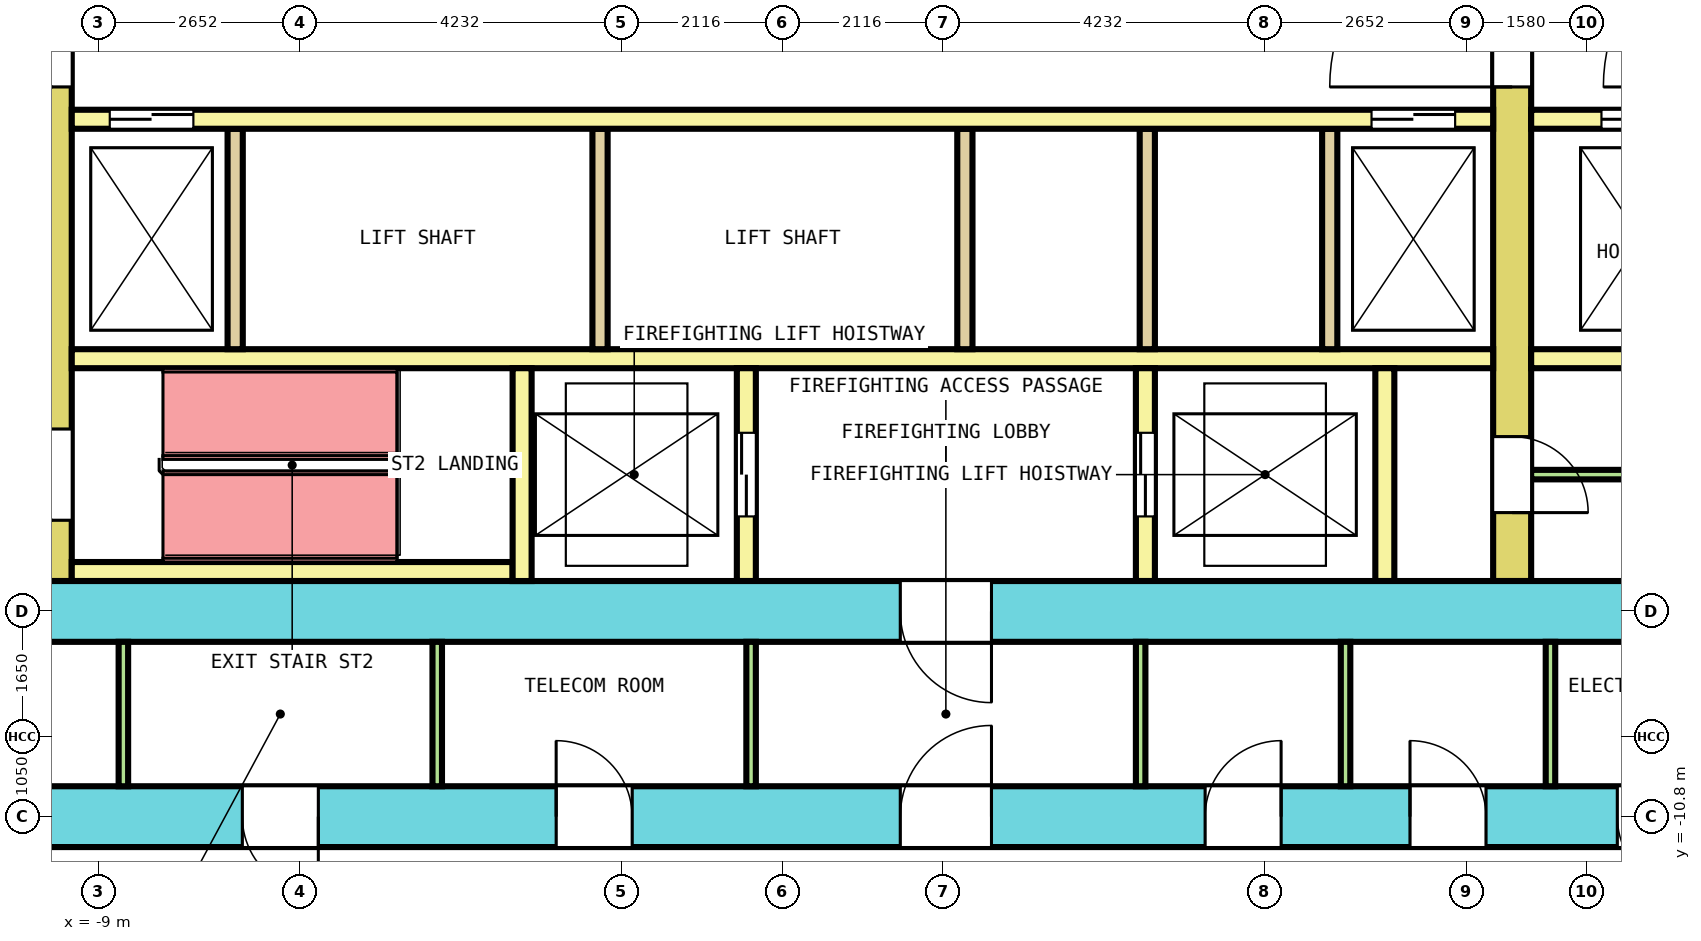
"""IFC4 building model, lengths in metres.
Left out: names, types, materials, properties, quantities, classifications, styles, units other than length and angle.
Written with IfcOpenShell. Run it as: python <this file> out.ifc"""

import sys

from ifc_helpers import new_model, si_unit, direction, frame, frame_2d, origin, place, context, subcontext, project, spatial, rectangle, extrude, element, fill, save


model = new_model("IFC4")
c1 = context("Model", 3, precision=1e-05, world=origin(), true_north=direction((0.0, 1.0)))
c2 = subcontext(c1, "Body", "Model", "MODEL_VIEW")
j1 = project(units=[si_unit("LENGTHUNIT", "METRE"), si_unit("PLANEANGLEUNIT", "RADIAN")], contexts=[c1])
p1 = place(None, origin())
s1 = spatial("IfcSite", under=j1, at=p1, CompositionType="ELEMENT")
p2 = place(p1, origin())
s2 = spatial("IfcBuilding", under=s1, at=p2, CompositionType="ELEMENT")
p3 = place(p2, frame((0.0, 0.0, 85.2)))
s3 = spatial("IfcBuildingStorey", under=s2, at=p3, CompositionType="ELEMENT", Elevation=85.2)
p4 = place(p3, frame((-13.6, -10.8, 0.0), z_axis=(0.0, 0.0, 1.0), x_axis=(1.0, 0.0, 0.0)))
e1 = element("IfcWall", 1, at=p4, inside=s3, PredefinedType="SHEAR", context=c2, shape_type="SweptSolid", body=[
    extrude(rectangle(XDim=27.2, YDim=0.8, at=frame_2d((13.6, 0.0))), origin(), (0.0, 0.0, 1.0), 4.1),
])
p5 = place(p4, frame((2.333, 0.0, 0.0)))
e2 = element("IfcOpeningElement", 2, at=p5, cuts=e1, PredefinedType="OPENING", context=c2, shape_type="SweptSolid", body=[
    extrude(rectangle(XDim=1.0, YDim=2.1, at=frame_2d((0.5, 1.05))), frame((0.0, 0.41, 0.0), z_axis=(0.0, -1.0, 0.0), x_axis=(1.0, 0.0, 0.0)), (0.0, 0.0, 1.0), 0.82),
])
p6 = place(p4, frame((6.494, 0.0, 0.0)))
e3 = element("IfcOpeningElement", 3, at=p6, cuts=e1, PredefinedType="OPENING", context=c2, shape_type="SweptSolid", body=[
    extrude(rectangle(XDim=1.0, YDim=2.1, at=frame_2d((0.5, 1.05))), frame((0.0, 0.41, 0.0), z_axis=(0.0, -1.0, 0.0), x_axis=(1.0, 0.0, 0.0)), (0.0, 0.0, 1.0), 0.82),
])
p7 = place(p4, frame((10.623, 0.0, 0.0)))
e4 = element("IfcOpeningElement", 4, at=p7, cuts=e1, PredefinedType="OPENING", context=c2, shape_type="SweptSolid", body=[
    extrude(rectangle(XDim=1.0, YDim=2.1, at=frame_2d((0.5, 1.05))), frame((0.0, 0.41, 0.0), z_axis=(0.0, -1.0, 0.0), x_axis=(1.0, 0.0, 0.0)), (0.0, 0.0, 1.0), 0.82),
])
p8 = place(p4, frame((19.16, 0.0, 0.0)))
e5 = element("IfcOpeningElement", 5, at=p8, cuts=e1, PredefinedType="OPENING", context=c2, shape_type="SweptSolid", body=[
    extrude(rectangle(XDim=1.0, YDim=2.1, at=frame_2d((0.5, 1.05))), frame((0.0, 0.41, 0.0), z_axis=(0.0, -1.0, 0.0), x_axis=(1.0, 0.0, 0.0)), (0.0, 0.0, 1.0), 0.82),
])
p9 = place(p4, frame((21.856, 0.0, 0.0)))
e6 = element("IfcOpeningElement", 6, at=p9, cuts=e1, PredefinedType="OPENING", context=c2, shape_type="SweptSolid", body=[
    extrude(rectangle(XDim=1.0, YDim=2.1, at=frame_2d((0.5, 1.05))), frame((0.0, 0.41, 0.0), z_axis=(0.0, -1.0, 0.0), x_axis=(1.0, 0.0, 0.0)), (0.0, 0.0, 1.0), 0.82),
])
p10 = place(p4, frame((24.583, 0.0, 0.0)))
e7 = element("IfcOpeningElement", 7, at=p10, cuts=e1, PredefinedType="OPENING", context=c2, shape_type="SweptSolid", body=[
    extrude(rectangle(XDim=1.0, YDim=2.1, at=frame_2d((0.5, 1.05))), frame((0.0, 0.41, 0.0), z_axis=(0.0, -1.0, 0.0), x_axis=(1.0, 0.0, 0.0)), (0.0, 0.0, 1.0), 0.82),
])
p11 = place(p4, frame((15.15, 0.0, 0.0)))
e8 = element("IfcOpeningElement", 8, at=p11, cuts=e1, PredefinedType="OPENING", context=c2, shape_type="SweptSolid", body=[
    extrude(rectangle(XDim=1.2, YDim=2.1, at=frame_2d((0.6, 1.05))), frame((0.0, 0.41, 0.0), z_axis=(0.0, -1.0, 0.0), x_axis=(1.0, 0.0, 0.0)), (0.0, 0.0, 1.0), 0.82),
])
p12 = place(p3, frame((-12.8, -8.1, 0.0), z_axis=(0.0, 0.0, 1.0), x_axis=(1.0, 0.0, 0.0)))
e9 = element("IfcWall", 9, at=p12, inside=s3, PredefinedType="SHEAR", context=c2, shape_type="SweptSolid", body=[
    extrude(rectangle(XDim=25.6, YDim=0.8, at=frame_2d((12.8, 0.0))), origin(), (0.0, 0.0, 1.0), 4.1),
])
p13 = place(p12, frame((14.35, 0.0, 0.0)))
e10 = element("IfcOpeningElement", 10, at=p13, cuts=e9, PredefinedType="OPENING", context=c2, shape_type="SweptSolid", body=[
    extrude(rectangle(XDim=1.2, YDim=2.1, at=frame_2d((0.6, 1.05))), frame((0.0, 0.41, 0.0), z_axis=(0.0, -1.0, 0.0), x_axis=(1.0, 0.0, 0.0)), (0.0, 0.0, 1.0), 0.82),
])
p14 = place(p3, frame((-9.6, -7.7, 0.0), z_axis=(0.0, 0.0, 1.0), x_axis=(0.0, 1.0, 0.0)))
e11 = element("IfcWall", 11, at=p14, inside=s3, PredefinedType="SHEAR", context=c2, shape_type="SweptSolid", body=[
    extrude(rectangle(XDim=15.4, YDim=0.5, at=frame_2d((7.7, 0.0))), origin(), (0.0, 0.0, 1.0), 4.1),
])
p15 = place(p14, frame((6.5, 0.0, 0.0)))
e12 = element("IfcOpeningElement", 12, at=p15, cuts=e11, PredefinedType="OPENING", context=c2, shape_type="SweptSolid", body=[
    extrude(rectangle(XDim=2.4, YDim=2.1, at=frame_2d((1.2, 1.05))), frame((0.0, 0.26, 0.0), z_axis=(0.0, -1.0, 0.0), x_axis=(1.0, 0.0, 0.0)), (0.0, 0.0, 1.0), 0.52),
])
p16 = place(p14, frame((13.4, 0.0, 0.0)))
e13 = element("IfcOpeningElement", 13, at=p16, cuts=e11, PredefinedType="OPENING", context=c2, shape_type="SweptSolid", body=[
    extrude(rectangle(XDim=1.2, YDim=2.1, at=frame_2d((0.6, 1.05))), frame((0.0, 0.26, 0.0), z_axis=(0.0, -1.0, 0.0), x_axis=(1.0, 0.0, 0.0)), (0.0, 0.0, 1.0), 0.52),
])
p17 = place(p14, frame((0.8, 0.0, 0.0)))
e14 = element("IfcOpeningElement", 14, at=p17, cuts=e11, PredefinedType="OPENING", context=c2, shape_type="SweptSolid", body=[
    extrude(rectangle(XDim=1.2, YDim=2.1, at=frame_2d((0.6, 1.05))), frame((0.0, 0.26, 0.0), z_axis=(0.0, -1.0, 0.0), x_axis=(1.0, 0.0, 0.0)), (0.0, 0.0, 1.0), 0.52),
])
p18 = place(p3, frame((9.6, -7.7, 0.0), z_axis=(0.0, 0.0, 1.0), x_axis=(0.0, 1.0, 0.0)))
e15 = element("IfcWall", 15, at=p18, inside=s3, PredefinedType="SHEAR", context=c2, shape_type="SweptSolid", body=[
    extrude(rectangle(XDim=15.4, YDim=0.5, at=frame_2d((7.7, 0.0))), origin(), (0.0, 0.0, 1.0), 4.1),
])
p19 = place(p18, frame((6.5, 0.0, 0.0)))
e16 = element("IfcOpeningElement", 16, at=p19, cuts=e15, PredefinedType="OPENING", context=c2, shape_type="SweptSolid", body=[
    extrude(rectangle(XDim=2.4, YDim=2.1, at=frame_2d((1.2, 1.05))), frame((0.0, 0.26, 0.0), z_axis=(0.0, -1.0, 0.0), x_axis=(1.0, 0.0, 0.0)), (0.0, 0.0, 1.0), 0.52),
])
p20 = place(p18, frame((13.4, 0.0, 0.0)))
e17 = element("IfcOpeningElement", 17, at=p20, cuts=e15, PredefinedType="OPENING", context=c2, shape_type="SweptSolid", body=[
    extrude(rectangle(XDim=1.2, YDim=2.1, at=frame_2d((0.6, 1.05))), frame((0.0, 0.26, 0.0), z_axis=(0.0, -1.0, 0.0), x_axis=(1.0, 0.0, 0.0)), (0.0, 0.0, 1.0), 0.52),
])
p21 = place(p18, frame((0.9, 0.0, 0.0)))
e18 = element("IfcOpeningElement", 18, at=p21, cuts=e15, PredefinedType="OPENING", context=c2, shape_type="SweptSolid", body=[
    extrude(rectangle(XDim=1.0, YDim=2.1, at=frame_2d((0.5, 1.05))), frame((0.0, 0.26, 0.0), z_axis=(0.0, -1.0, 0.0), x_axis=(1.0, 0.0, 0.0)), (0.0, 0.0, 1.0), 0.52),
])
p22 = place(p3, frame((-9.35, -1.625, 0.0), z_axis=(0.0, 0.0, 1.0), x_axis=(1.0, 0.0, 0.0)))
e19 = element("IfcWall", 19, at=p22, inside=s3, PredefinedType="SOLIDWALL", context=c2, shape_type="SweptSolid", body=[
    extrude(rectangle(XDim=18.7, YDim=0.25, at=frame_2d((9.35, 0.0))), origin(), (0.0, 0.0, 1.0), 4.1),
])
p23 = place(p22, frame((0.5, 0.0, 0.0)))
e20 = element("IfcOpeningElement", 20, at=p23, cuts=e19, PredefinedType="OPENING", context=c2, shape_type="SweptSolid", body=[
    extrude(rectangle(XDim=1.1, YDim=2.1, at=frame_2d((0.55, 1.05))), frame((0.0, 0.135, 0.0), z_axis=(0.0, -1.0, 0.0), x_axis=(1.0, 0.0, 0.0)), (0.0, 0.0, 1.0), 0.27),
])
p24 = place(p22, frame((17.1, 0.0, 0.0)))
e21 = element("IfcOpeningElement", 21, at=p24, cuts=e19, PredefinedType="OPENING", context=c2, shape_type="SweptSolid", body=[
    extrude(rectangle(XDim=1.1, YDim=2.1, at=frame_2d((0.55, 1.05))), frame((0.0, 0.135, 0.0), z_axis=(0.0, -1.0, 0.0), x_axis=(1.0, 0.0, 0.0)), (0.0, 0.0, 1.0), 0.27),
])
p25 = place(p3, frame((9.85, -1.625, 0.0), z_axis=(0.0, 0.0, 1.0), x_axis=(1.0, 0.0, 0.0)))
e22 = element("IfcWall", 22, at=p25, inside=s3, PredefinedType="SOLIDWALL", context=c2, shape_type="SweptSolid", body=[
    extrude(rectangle(XDim=2.95, YDim=0.25, at=frame_2d((1.475, 0.0))), origin(), (0.0, 0.0, 1.0), 4.1),
])
p26 = place(p25, frame((0.925, 0.0, 0.0)))
e23 = element("IfcOpeningElement", 23, at=p26, cuts=e22, PredefinedType="OPENING", context=c2, shape_type="SweptSolid", body=[
    extrude(rectangle(XDim=1.1, YDim=2.1, at=frame_2d((0.55, 1.05))), frame((0.0, 0.135, 0.0), z_axis=(0.0, -1.0, 0.0), x_axis=(1.0, 0.0, 0.0)), (0.0, 0.0, 1.0), 0.27),
])
p27 = place(p3, frame((-9.35, -4.775, 0.0), z_axis=(0.0, 0.0, 1.0), x_axis=(1.0, 0.0, 0.0)))
e24 = element("IfcWall", 24, at=p27, inside=s3, PredefinedType="SOLIDWALL", context=c2, shape_type="SweptSolid", body=[
    extrude(rectangle(XDim=18.7, YDim=0.25, at=frame_2d((9.35, 0.0))), origin(), (0.0, 0.0, 1.0), 4.1),
])
p28 = place(p3, frame((9.85, -4.775, 0.0), z_axis=(0.0, 0.0, 1.0), x_axis=(1.0, 0.0, 0.0)))
e25 = element("IfcWall", 25, at=p28, inside=s3, PredefinedType="SOLIDWALL", context=c2, shape_type="SweptSolid", body=[
    extrude(rectangle(XDim=2.95, YDim=0.25, at=frame_2d((1.475, 0.0))), origin(), (0.0, 0.0, 1.0), 4.1),
])
for number, where, z_axis, x_axis in (
    (26, (-7.2, -4.65, 0.0), (0.0, 0.0, 1.0), (0.0, 1.0, 0.0)),
    (27, (-2.4, -4.65, 0.0), (0.0, 0.0, 1.0), (0.0, 1.0, 0.0)),
    (28, (2.4, -4.65, 0.0), (0.0, 0.0, 1.0), (0.0, 1.0, 0.0)),
    (29, (4.8, -4.65, 0.0), (0.0, 0.0, 1.0), (0.0, 1.0, 0.0)),
    (30, (7.2, -4.65, 0.0), (0.0, 0.0, 1.0), (0.0, 1.0, 0.0)),
):
    element("IfcWall", number, at=place(p3, frame(where, z_axis=z_axis, x_axis=x_axis)), inside=s3, PredefinedType="SOLIDWALL", context=c2, shape_type="SweptSolid", body=[
        extrude(rectangle(XDim=2.9, YDim=0.2, at=frame_2d((1.45, 0.0))), origin(), (0.0, 0.0, 1.0), 4.1),
    ])
p29 = place(p3, frame((-9.35, -7.575, 0.0), z_axis=(0.0, 0.0, 1.0), x_axis=(1.0, 0.0, 0.0)))
e31 = element("IfcWall", 31, at=p29, inside=s3, PredefinedType="SOLIDWALL", context=c2, shape_type="SweptSolid", body=[
    extrude(rectangle(XDim=5.8, YDim=0.25, at=frame_2d((2.9, 0.0))), origin(), (0.0, 0.0, 1.0), 4.1),
])
p30 = place(p3, frame((-3.425, -7.7, 0.0), z_axis=(0.0, 0.0, 1.0), x_axis=(0.0, 1.0, 0.0)))
e32 = element("IfcWall", 32, at=p30, inside=s3, PredefinedType="SOLIDWALL", context=c2, shape_type="SweptSolid", body=[
    extrude(rectangle(XDim=2.8, YDim=0.25, at=frame_2d((1.4, 0.0))), origin(), (0.0, 0.0, 1.0), 4.1),
])
p31 = place(p3, frame((-0.475, -7.7, 0.0), z_axis=(0.0, 0.0, 1.0), x_axis=(0.0, 1.0, 0.0)))
e33 = element("IfcWall", 33, at=p31, inside=s3, PredefinedType="SOLIDWALL", context=c2, shape_type="SweptSolid", body=[
    extrude(rectangle(XDim=2.8, YDim=0.25, at=frame_2d((1.4, 0.0))), origin(), (0.0, 0.0, 1.0), 4.1),
])
p32 = place(p31, frame((0.85, 0.0, 0.0)))
e34 = element("IfcOpeningElement", 34, at=p32, cuts=e33, PredefinedType="OPENING", context=c2, shape_type="SweptSolid", body=[
    extrude(rectangle(XDim=1.1, YDim=2.1, at=frame_2d((0.55, 1.05))), frame((0.0, 0.135, 0.0), z_axis=(0.0, -1.0, 0.0), x_axis=(1.0, 0.0, 0.0)), (0.0, 0.0, 1.0), 0.27),
])
p33 = place(p3, frame((4.775, -7.7, 0.0), z_axis=(0.0, 0.0, 1.0), x_axis=(0.0, 1.0, 0.0)))
e35 = element("IfcWall", 35, at=p33, inside=s3, PredefinedType="SOLIDWALL", context=c2, shape_type="SweptSolid", body=[
    extrude(rectangle(XDim=2.8, YDim=0.25, at=frame_2d((1.4, 0.0))), origin(), (0.0, 0.0, 1.0), 4.1),
])
p34 = place(p33, frame((0.85, 0.0, 0.0)))
e36 = element("IfcOpeningElement", 36, at=p34, cuts=e35, PredefinedType="OPENING", context=c2, shape_type="SweptSolid", body=[
    extrude(rectangle(XDim=1.1, YDim=2.1, at=frame_2d((0.55, 1.05))), frame((0.0, 0.135, 0.0), z_axis=(0.0, -1.0, 0.0), x_axis=(1.0, 0.0, 0.0)), (0.0, 0.0, 1.0), 0.27),
])
p35 = place(p3, frame((7.925, -7.7, 0.0), z_axis=(0.0, 0.0, 1.0), x_axis=(0.0, 1.0, 0.0)))
e37 = element("IfcWall", 37, at=p35, inside=s3, PredefinedType="SOLIDWALL", context=c2, shape_type="SweptSolid", body=[
    extrude(rectangle(XDim=2.8, YDim=0.25, at=frame_2d((1.4, 0.0))), origin(), (0.0, 0.0, 1.0), 4.1),
])
p36 = place(p3, frame((9.85, -6.3, 0.0), z_axis=(0.0, 0.0, 1.0), x_axis=(1.0, 0.0, 0.0)))
e38 = element("IfcWall", 38, at=p36, inside=s3, PredefinedType="PARTITIONING", context=c2, shape_type="SweptSolid", body=[
    extrude(rectangle(XDim=2.95, YDim=0.125, at=frame_2d((1.475, 0.0))), origin(), (0.0, 0.0, 1.0), 4.1),
])
for number, where, z_axis, x_axis in (
    (39, (-8.671, -10.4, 0.0), (0.0, 0.0, 1.0), (0.0, 1.0, 0.0)),
    (40, (-4.542, -10.4, 0.0), (0.0, 0.0, 1.0), (0.0, 1.0, 0.0)),
    (41, (-0.413, -10.4, 0.0), (0.0, 0.0, 1.0), (0.0, 1.0, 0.0)),
    (42, (4.712, -10.4, 0.0), (0.0, 0.0, 1.0), (0.0, 1.0, 0.0)),
    (43, (7.408, -10.4, 0.0), (0.0, 0.0, 1.0), (0.0, 1.0, 0.0)),
    (44, (10.104, -10.4, 0.0), (0.0, 0.0, 1.0), (0.0, 1.0, 0.0)),
):
    element("IfcWall", number, at=place(p3, frame(where, z_axis=z_axis, x_axis=x_axis)), inside=s3, PredefinedType="PARTITIONING", context=c2, shape_type="SweptSolid", body=[
        extrude(rectangle(XDim=1.9, YDim=0.125, at=frame_2d((0.95, 0.0))), origin(), (0.0, 0.0, 1.0), 4.1),
    ])
p37 = place(p23, origin())
e45 = element("IfcDoor", 45, at=p37, inside=s3, OperationType="DOUBLE_DOOR_SLIDING", PredefinedType="DOOR", context=c2, shape_type="SweptSolid", body=[
    extrude(rectangle(XDim=1.1, YDim=2.1, at=frame_2d((0.55, 1.05))), frame((0.0, 0.075, 0.0), z_axis=(0.0, -1.0, 0.0), x_axis=(1.0, 0.0, 0.0)), (0.0, 0.0, 1.0), 0.15),
])
fill(e20, e45)
p38 = place(p24, origin())
e46 = element("IfcDoor", 46, at=p38, inside=s3, OperationType="DOUBLE_DOOR_SLIDING", PredefinedType="DOOR", context=c2, shape_type="SweptSolid", body=[
    extrude(rectangle(XDim=1.1, YDim=2.1, at=frame_2d((0.55, 1.05))), frame((0.0, 0.075, 0.0), z_axis=(0.0, -1.0, 0.0), x_axis=(1.0, 0.0, 0.0)), (0.0, 0.0, 1.0), 0.15),
])
fill(e21, e46)
p39 = place(p26, origin())
e47 = element("IfcDoor", 47, at=p39, inside=s3, OperationType="DOUBLE_DOOR_SLIDING", PredefinedType="DOOR", context=c2, shape_type="SweptSolid", body=[
    extrude(rectangle(XDim=1.1, YDim=2.1, at=frame_2d((0.55, 1.05))), frame((0.0, 0.075, 0.0), z_axis=(0.0, -1.0, 0.0), x_axis=(1.0, 0.0, 0.0)), (0.0, 0.0, 1.0), 0.15),
])
fill(e23, e47)
p40 = place(p32, origin())
e48 = element("IfcDoor", 48, at=p40, inside=s3, OperationType="DOUBLE_DOOR_SLIDING", PredefinedType="DOOR", context=c2, shape_type="SweptSolid", body=[
    extrude(rectangle(XDim=1.1, YDim=2.1, at=frame_2d((0.55, 1.05))), frame((0.0, 0.075, 0.0), z_axis=(0.0, -1.0, 0.0), x_axis=(1.0, 0.0, 0.0)), (0.0, 0.0, 1.0), 0.15),
])
fill(e34, e48)
p41 = place(p34, origin())
e49 = element("IfcDoor", 49, at=p41, inside=s3, OperationType="DOUBLE_DOOR_SLIDING", PredefinedType="DOOR", context=c2, shape_type="SweptSolid", body=[
    extrude(rectangle(XDim=1.1, YDim=2.1, at=frame_2d((0.55, 1.05))), frame((0.0, 0.075, 0.0), z_axis=(0.0, -1.0, 0.0), x_axis=(1.0, 0.0, 0.0)), (0.0, 0.0, 1.0), 0.15),
])
fill(e36, e49)
p42 = place(p15, origin())
e50 = element("IfcDoor", 50, at=p42, inside=s3, OperationType="DOUBLE_DOOR_SINGLE_SWING", PredefinedType="DOOR", context=c2, shape_type="SweptSolid", body=[
    extrude(rectangle(XDim=2.4, YDim=2.1, at=frame_2d((1.2, 1.05))), frame((0.0, 0.2, 0.0), z_axis=(0.0, -1.0, 0.0), x_axis=(1.0, 0.0, 0.0)), (0.0, 0.0, 1.0), 0.4),
])
fill(e12, e50)
p43 = place(p19, origin())
e51 = element("IfcDoor", 51, at=p43, inside=s3, OperationType="DOUBLE_DOOR_SINGLE_SWING", PredefinedType="DOOR", context=c2, shape_type="SweptSolid", body=[
    extrude(rectangle(XDim=2.4, YDim=2.1, at=frame_2d((1.2, 1.05))), frame((0.0, 0.2, 0.0), z_axis=(0.0, -1.0, 0.0), x_axis=(1.0, 0.0, 0.0)), (0.0, 0.0, 1.0), 0.4),
])
fill(e16, e51)
p44 = place(p17, origin())
e52 = element("IfcDoor", 52, at=p44, inside=s3, OperationType="SINGLE_SWING_LEFT", PredefinedType="DOOR", context=c2, shape_type="SweptSolid", body=[
    extrude(rectangle(XDim=1.2, YDim=2.1, at=frame_2d((0.6, 1.05))), frame((0.0, 0.2, 0.0), z_axis=(0.0, -1.0, 0.0), x_axis=(1.0, 0.0, 0.0)), (0.0, 0.0, 1.0), 0.4),
])
fill(e14, e52)
p45 = place(p13, origin())
e53 = element("IfcDoor", 53, at=p45, inside=s3, OperationType="SINGLE_SWING_LEFT", PredefinedType="DOOR", context=c2, shape_type="SweptSolid", body=[
    extrude(rectangle(XDim=1.2, YDim=2.1, at=frame_2d((0.6, 1.05))), frame((0.0, 0.3, 0.0), z_axis=(0.0, -1.0, 0.0), x_axis=(1.0, 0.0, 0.0)), (0.0, 0.0, 1.0), 0.6),
])
fill(e10, e53)
p46 = place(p21, origin())
e54 = element("IfcDoor", 54, at=p46, inside=s3, OperationType="SINGLE_SWING_LEFT", PredefinedType="DOOR", context=c2, shape_type="SweptSolid", body=[
    extrude(rectangle(XDim=1.0, YDim=2.1, at=frame_2d((0.5, 1.05))), frame((0.0, 0.2, 0.0), z_axis=(0.0, -1.0, 0.0), x_axis=(1.0, 0.0, 0.0)), (0.0, 0.0, 1.0), 0.4),
])
fill(e18, e54)
p47 = place(p6, origin())
e55 = element("IfcDoor", 55, at=p47, inside=s3, OperationType="SINGLE_SWING_LEFT", PredefinedType="DOOR", context=c2, shape_type="SweptSolid", body=[
    extrude(rectangle(XDim=1.0, YDim=2.1, at=frame_2d((0.5, 1.05))), frame((0.0, 0.3, 0.0), z_axis=(0.0, -1.0, 0.0), x_axis=(1.0, 0.0, 0.0)), (0.0, 0.0, 1.0), 0.6),
])
fill(e3, e55)
p48 = place(p7, origin())
e56 = element("IfcDoor", 56, at=p48, inside=s3, OperationType="SINGLE_SWING_RIGHT", PredefinedType="DOOR", context=c2, shape_type="SweptSolid", body=[
    extrude(rectangle(XDim=1.0, YDim=2.1, at=frame_2d((0.5, 1.05))), frame((0.0, 0.3, 0.0), z_axis=(0.0, -1.0, 0.0), x_axis=(1.0, 0.0, 0.0)), (0.0, 0.0, 1.0), 0.6),
])
fill(e4, e56)
p49 = place(p8, origin())
e57 = element("IfcDoor", 57, at=p49, inside=s3, OperationType="SINGLE_SWING_LEFT", PredefinedType="DOOR", context=c2, shape_type="SweptSolid", body=[
    extrude(rectangle(XDim=1.0, YDim=2.1, at=frame_2d((0.5, 1.05))), frame((0.0, 0.3, 0.0), z_axis=(0.0, -1.0, 0.0), x_axis=(1.0, 0.0, 0.0)), (0.0, 0.0, 1.0), 0.6),
])
fill(e5, e57)
p50 = place(p9, origin())
e58 = element("IfcDoor", 58, at=p50, inside=s3, OperationType="SINGLE_SWING_RIGHT", PredefinedType="DOOR", context=c2, shape_type="SweptSolid", body=[
    extrude(rectangle(XDim=1.0, YDim=2.1, at=frame_2d((0.5, 1.05))), frame((0.0, 0.3, 0.0), z_axis=(0.0, -1.0, 0.0), x_axis=(1.0, 0.0, 0.0)), (0.0, 0.0, 1.0), 0.6),
])
fill(e6, e58)
p51 = place(p10, origin())
e59 = element("IfcDoor", 59, at=p51, inside=s3, OperationType="SINGLE_SWING_LEFT", PredefinedType="DOOR", context=c2, shape_type="SweptSolid", body=[
    extrude(rectangle(XDim=1.0, YDim=2.1, at=frame_2d((0.5, 1.05))), frame((0.0, 0.3, 0.0), z_axis=(0.0, -1.0, 0.0), x_axis=(1.0, 0.0, 0.0)), (0.0, 0.0, 1.0), 0.6),
])
fill(e7, e59)
p52 = place(p11, origin())
e60 = element("IfcDoor", 60, at=p52, inside=s3, OperationType="SINGLE_SWING_RIGHT", PredefinedType="DOOR", context=c2, shape_type="SweptSolid", body=[
    extrude(rectangle(XDim=1.2, YDim=2.1, at=frame_2d((0.6, 1.05))), frame((0.0, 0.3, 0.0), z_axis=(0.0, -1.0, 0.0), x_axis=(1.0, 0.0, 0.0)), (0.0, 0.0, 1.0), 0.6),
])
fill(e8, e60)
save(model, sys.argv[1])
